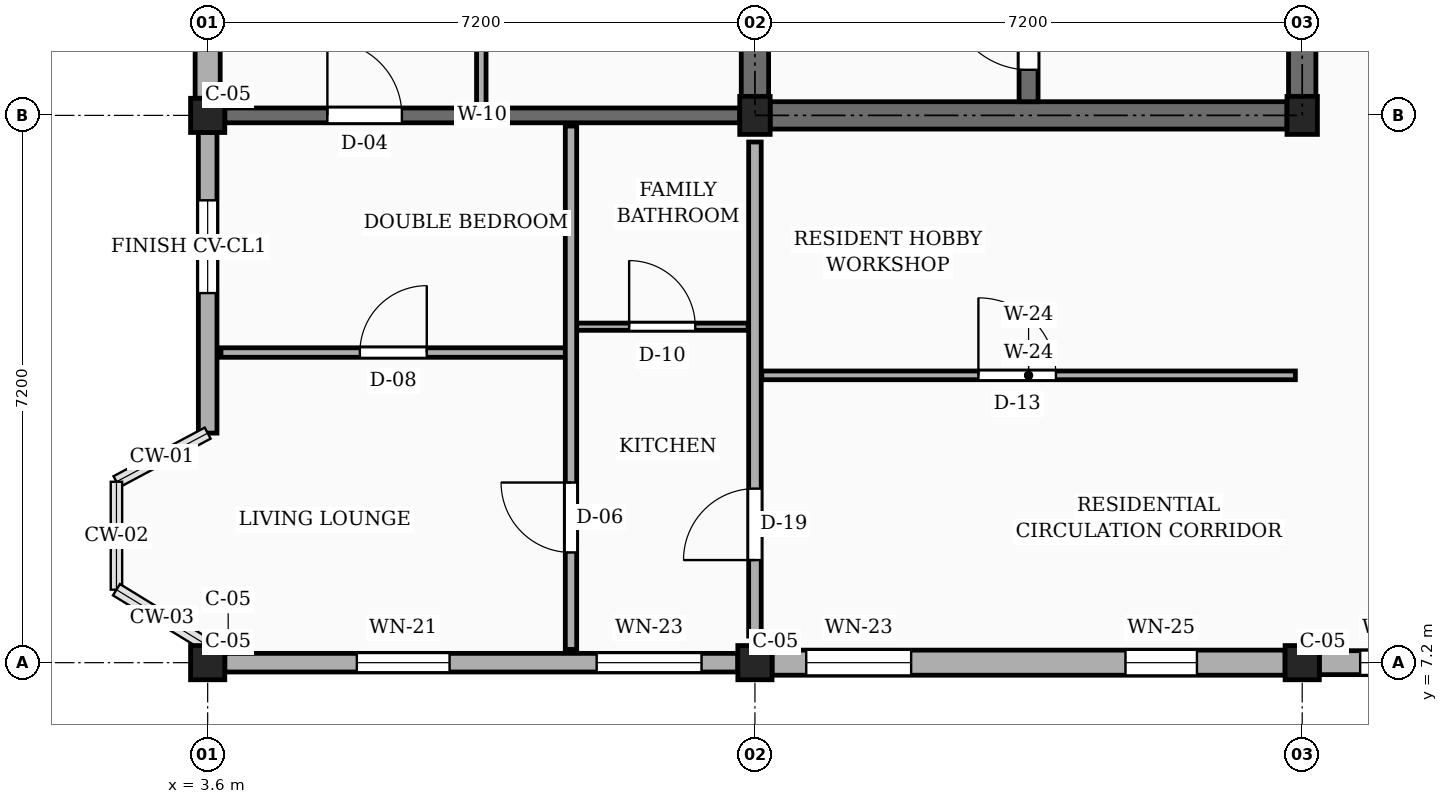
"""IFC4 building model, lengths in metres.
Left out: names, types, materials, properties, quantities, classifications, styles, units other than length and angle.
Written with IfcOpenShell. Run it as: python <this file> out.ifc"""

import sys

from ifc_helpers import new_model, si_unit, direction, frame, frame_2d, origin, origin_2d, place, context, subcontext, project, spatial, rectangle, extrude, element, fill, save


model = new_model("IFC4")
c1 = context("Model", 3, precision=1e-05, world=origin(), true_north=direction((0.0, 1.0)))
c2 = subcontext(c1, "Body", "Model", "MODEL_VIEW")
j1 = project(units=[si_unit("LENGTHUNIT", "METRE"), si_unit("PLANEANGLEUNIT", "RADIAN")], contexts=[c1])
p1 = place(None, origin())
s1 = spatial("IfcSite", under=j1, at=p1, CompositionType="ELEMENT")
p2 = place(p1, origin())
s2 = spatial("IfcBuilding", under=s1, at=p2, CompositionType="ELEMENT")
p3 = place(p2, frame((0.0, 0.0, 42.3)))
s3 = spatial("IfcBuildingStorey", under=s2, at=p3, CompositionType="ELEMENT", Elevation=42.3)
for number, where, z_axis, x_axis in (
    (1, (3.6, 7.2, 0.0), (0.0, 0.0, 1.0), (1.0, 0.0, 0.0)),
    (2, (3.6, 14.4, 0.0), (0.0, 0.0, 1.0), (1.0, 0.0, 0.0)),
    (3, (10.8, 7.2, 0.0), (0.0, 0.0, 1.0), (1.0, 0.0, 0.0)),
):
    element("IfcColumn", number, at=place(p3, frame(where, z_axis=z_axis, x_axis=x_axis)), inside=s3, PredefinedType="COLUMN", context=c2, shape_type="SweptSolid", body=[
        extrude(rectangle(XDim=0.45, YDim=0.45, at=origin_2d()), origin(), (0.0, 0.0, 1.0), 3.15),
    ])
p4 = place(p3, frame((10.8, 14.4, 0.0), z_axis=(0.0, 0.0, 1.0), x_axis=(1.0, 0.0, 0.0)))
e4 = element("IfcColumn", 4, at=p4, inside=s3, PredefinedType="COLUMN", context=c2, shape_type="SweptSolid", body=[
    extrude(rectangle(XDim=0.4, YDim=0.5, at=origin_2d()), origin(), (0.0, 0.0, 1.0), 3.15),
])
p5 = place(p3, frame((18.0, 7.2, 0.0), z_axis=(0.0, 0.0, 1.0), x_axis=(1.0, 0.0, 0.0)))
e5 = element("IfcColumn", 5, at=p5, inside=s3, PredefinedType="COLUMN", context=c2, shape_type="SweptSolid", body=[
    extrude(rectangle(XDim=0.45, YDim=0.45, at=origin_2d()), origin(), (0.0, 0.0, 1.0), 3.15),
])
p6 = place(p3, frame((18.0, 14.4, 0.0), z_axis=(0.0, 0.0, 1.0), x_axis=(1.0, 0.0, 0.0)))
e6 = element("IfcColumn", 6, at=p6, inside=s3, PredefinedType="COLUMN", context=c2, shape_type="SweptSolid", body=[
    extrude(rectangle(XDim=0.4, YDim=0.5, at=origin_2d()), origin(), (0.0, 0.0, 1.0), 3.15),
])
p7 = place(p3, frame((3.825, 14.4, 0.0), z_axis=(0.0, 0.0, 1.0), x_axis=(1.0, 0.0, 0.0)))
e7 = element("IfcWall", 7, at=p7, inside=s3, PredefinedType="SOLIDWALL", context=c2, shape_type="SweptSolid", body=[
    extrude(rectangle(XDim=6.775, YDim=0.195, at=frame_2d((3.388, 0.0))), origin(), (0.0, 0.0, 1.0), 2.17),
])
p8 = place(p7, frame((1.35, 0.0, 0.0)))
e8 = element("IfcOpeningElement", 8, at=p8, cuts=e7, PredefinedType="OPENING", context=c2, shape_type="SweptSolid", body=[
    extrude(rectangle(XDim=0.98, YDim=2.12, at=frame_2d((0.49, 1.06))), frame((0.0, 0.107, 0.0), z_axis=(0.0, -1.0, 0.0), x_axis=(1.0, 0.0, 0.0)), (0.0, 0.0, 1.0), 0.215),
])
p9 = place(p3, frame((3.825, 7.2, 0.0), z_axis=(0.0, 0.0, 1.0), x_axis=(1.0, 0.0, 0.0)))
e9 = element("IfcWall", 9, at=p9, inside=s3, PredefinedType="SOLIDWALL", context=c2, shape_type="SweptSolid", body=[
    extrude(rectangle(XDim=6.75, YDim=0.245, at=frame_2d((3.375, 0.0))), origin(), (0.0, 0.0, 1.0), 2.44),
])
p10 = place(p9, frame((1.738, 0.0, 0.78)))
e10 = element("IfcOpeningElement", 10, at=p10, cuts=e9, PredefinedType="OPENING", context=c2, shape_type="SweptSolid", body=[
    extrude(rectangle(XDim=1.22, YDim=1.36, at=frame_2d((0.61, 0.68))), frame((0.0, 0.133, 0.0), z_axis=(0.0, -1.0, 0.0), x_axis=(1.0, 0.0, 0.0)), (0.0, 0.0, 1.0), 0.265),
])
p11 = place(p9, frame((4.893, 0.0, 0.78)))
e11 = element("IfcOpeningElement", 11, at=p11, cuts=e9, PredefinedType="OPENING", context=c2, shape_type="SweptSolid", body=[
    extrude(rectangle(XDim=1.38, YDim=1.36, at=frame_2d((0.69, 0.68))), frame((0.0, 0.133, 0.0), z_axis=(0.0, -1.0, 0.0), x_axis=(1.0, 0.0, 0.0)), (0.0, 0.0, 1.0), 0.265),
])
p12 = place(p3, frame((11.025, 7.2, 0.0), z_axis=(0.0, 0.0, 1.0), x_axis=(1.0, 0.0, 0.0)))
e12 = element("IfcWall", 12, at=p12, inside=s3, PredefinedType="SOLIDWALL", context=c2, shape_type="SweptSolid", body=[
    extrude(rectangle(XDim=6.75, YDim=0.33, at=frame_2d((3.375, 0.0))), origin(), (0.0, 0.0, 1.0), 2.44),
])
p13 = place(p12, frame((0.45, 0.0, 0.78)))
e13 = element("IfcOpeningElement", 13, at=p13, cuts=e12, PredefinedType="OPENING", context=c2, shape_type="SweptSolid", body=[
    extrude(rectangle(XDim=1.38, YDim=1.36, at=frame_2d((0.69, 0.68))), frame((0.0, 0.175, 0.0), z_axis=(0.0, -1.0, 0.0), x_axis=(1.0, 0.0, 0.0)), (0.0, 0.0, 1.0), 0.35),
])
p14 = place(p12, frame((4.65, 0.0, 0.78)))
e14 = element("IfcOpeningElement", 14, at=p14, cuts=e12, PredefinedType="OPENING", context=c2, shape_type="SweptSolid", body=[
    extrude(rectangle(XDim=0.94, YDim=1.44, at=frame_2d((0.47, 0.72))), frame((0.0, 0.175, 0.0), z_axis=(0.0, -1.0, 0.0), x_axis=(1.0, 0.0, 0.0)), (0.0, 0.0, 1.0), 0.35),
])
p15 = place(p3, frame((18.225, 7.2, 0.0), z_axis=(0.0, 0.0, 1.0), x_axis=(1.0, 0.0, 0.0)))
e15 = element("IfcWall", 15, at=p15, inside=s3, PredefinedType="SOLIDWALL", context=c2, shape_type="SweptSolid", body=[
    extrude(rectangle(XDim=6.75, YDim=0.315, at=frame_2d((3.375, 0.0))), origin(), (0.0, 0.0, 1.0), 2.44),
])
p16 = place(p15, frame((0.538, 0.0, 0.78)))
e16 = element("IfcOpeningElement", 16, at=p16, cuts=e15, PredefinedType="OPENING", context=c2, shape_type="SweptSolid", body=[
    extrude(rectangle(XDim=0.94, YDim=1.44, at=frame_2d((0.47, 0.72))), frame((0.0, 0.167, 0.0), z_axis=(0.0, -1.0, 0.0), x_axis=(1.0, 0.0, 0.0)), (0.0, 0.0, 1.0), 0.335),
])
p17 = place(p15, frame((2.27, 0.0, 0.78)))
e17 = element("IfcOpeningElement", 17, at=p17, cuts=e15, PredefinedType="OPENING", context=c2, shape_type="SweptSolid", body=[
    extrude(rectangle(XDim=1.15, YDim=1.44, at=frame_2d((0.575, 0.72))), frame((0.0, 0.167, 0.0), z_axis=(0.0, -1.0, 0.0), x_axis=(1.0, 0.0, 0.0)), (0.0, 0.0, 1.0), 0.335),
])
p18 = place(p15, frame((4.538, 0.0, 0.78)))
e18 = element("IfcOpeningElement", 18, at=p18, cuts=e15, PredefinedType="OPENING", context=c2, shape_type="SweptSolid", body=[
    extrude(rectangle(XDim=1.35, YDim=1.44, at=frame_2d((0.675, 0.72))), frame((0.0, 0.167, 0.0), z_axis=(0.0, -1.0, 0.0), x_axis=(1.0, 0.0, 0.0)), (0.0, 0.0, 1.0), 0.335),
])
p19 = place(p3, frame((3.6, 21.375, 0.0), z_axis=(0.0, 0.0, 1.0), x_axis=(0.0, -1.0, 0.0)))
e19 = element("IfcWall", 19, at=p19, inside=s3, PredefinedType="SOLIDWALL", context=c2, shape_type="SweptSolid", body=[
    extrude(rectangle(XDim=6.75, YDim=0.33, at=frame_2d((3.375, 0.0))), origin(), (0.0, 0.0, 1.0), 2.44),
])
p20 = place(p19, frame((0.45, 0.0, 0.78)))
e20 = element("IfcOpeningElement", 20, at=p20, cuts=e19, PredefinedType="OPENING", context=c2, shape_type="SweptSolid", body=[
    extrude(rectangle(XDim=1.06, YDim=1.36, at=frame_2d((0.53, 0.68))), frame((0.0, 0.175, 0.0), z_axis=(0.0, -1.0, 0.0), x_axis=(1.0, 0.0, 0.0)), (0.0, 0.0, 1.0), 0.35),
])
p21 = place(p19, frame((4.65, 0.0, 0.78)))
e21 = element("IfcOpeningElement", 21, at=p21, cuts=e19, PredefinedType="OPENING", context=c2, shape_type="SweptSolid", body=[
    extrude(rectangle(XDim=1.22, YDim=1.36, at=frame_2d((0.61, 0.68))), frame((0.0, 0.175, 0.0), z_axis=(0.0, -1.0, 0.0), x_axis=(1.0, 0.0, 0.0)), (0.0, 0.0, 1.0), 0.35),
])
p22 = place(p3, frame((3.6, 14.175, 0.0), z_axis=(0.0, 0.0, 1.0), x_axis=(0.0, -1.0, 0.0)))
e22 = element("IfcWall", 22, at=p22, inside=s3, PredefinedType="SOLIDWALL", context=c2, shape_type="SweptSolid", body=[
    extrude(rectangle(XDim=3.955, YDim=0.245, at=frame_2d((1.978, 0.0))), origin(), (0.0, 0.0, 1.0), 2.44),
])
p23 = place(p22, frame((0.893, 0.0, 0.78)))
e23 = element("IfcOpeningElement", 23, at=p23, cuts=e22, PredefinedType="OPENING", context=c2, shape_type="SweptSolid", body=[
    extrude(rectangle(XDim=1.22, YDim=1.36, at=frame_2d((0.61, 0.68))), frame((0.0, 0.133, 0.0), z_axis=(0.0, -1.0, 0.0), x_axis=(1.0, 0.0, 0.0)), (0.0, 0.0, 1.0), 0.265),
])
p24 = place(p3, frame((10.8, 14.65, 0.0), z_axis=(0.0, 0.0, 1.0), x_axis=(0.0, 1.0, 0.0)))
e24 = element("IfcWall", 24, at=p24, inside=s3, PredefinedType="SHEAR", context=c2, shape_type="SweptSolid", body=[
    extrude(rectangle(XDim=6.7, YDim=0.36, at=frame_2d((3.35, 0.0))), origin(), (0.0, 0.0, 1.0), 2.87),
])
p25 = place(p3, frame((18.0, 14.65, 0.0), z_axis=(0.0, 0.0, 1.0), x_axis=(0.0, 1.0, 0.0)))
e25 = element("IfcWall", 25, at=p25, inside=s3, PredefinedType="SHEAR", context=c2, shape_type="SweptSolid", body=[
    extrude(rectangle(XDim=6.7, YDim=0.36, at=frame_2d((3.35, 0.0))), origin(), (0.0, 0.0, 1.0), 2.87),
])
p26 = place(p25, frame((1.5, 0.0, 0.0)))
e26 = element("IfcOpeningElement", 26, at=p26, cuts=e25, PredefinedType="OPENING", context=c2, shape_type="SweptSolid", body=[
    extrude(rectangle(XDim=1.1, YDim=2.15, at=frame_2d((0.55, 1.075))), frame((0.0, 0.19, 0.0), z_axis=(0.0, -1.0, 0.0), x_axis=(1.0, 0.0, 0.0)), (0.0, 0.0, 1.0), 0.38),
])
p27 = place(p3, frame((11.0, 14.4, 0.0), z_axis=(0.0, 0.0, 1.0), x_axis=(1.0, 0.0, 0.0)))
e27 = element("IfcWall", 27, at=p27, inside=s3, PredefinedType="SHEAR", context=c2, shape_type="SweptSolid", body=[
    extrude(rectangle(XDim=6.8, YDim=0.36, at=frame_2d((3.4, 0.0))), origin(), (0.0, 0.0, 1.0), 2.87),
])
p28 = place(p3, frame((14.4, 14.58, 0.0), z_axis=(0.0, 0.0, 1.0), x_axis=(0.0, 1.0, 0.0)))
e28 = element("IfcWall", 28, at=p28, inside=s3, PredefinedType="SHEAR", context=c2, shape_type="SweptSolid", body=[
    extrude(rectangle(XDim=6.84, YDim=0.25, at=frame_2d((3.42, 0.0))), origin(), (0.0, 0.0, 1.0), 2.87),
])
p29 = place(p28, frame((0.42, 0.0, 0.0)))
e29 = element("IfcOpeningElement", 29, at=p29, cuts=e28, PredefinedType="OPENING", context=c2, shape_type="SweptSolid", body=[
    extrude(rectangle(XDim=1.05, YDim=2.15, at=frame_2d((0.525, 1.075))), frame((0.0, 0.135, 0.0), z_axis=(0.0, -1.0, 0.0), x_axis=(1.0, 0.0, 0.0)), (0.0, 0.0, 1.0), 0.27),
])
p30 = place(p3, frame((10.8, 7.55, 0.0), z_axis=(0.0, 0.0, 1.0), x_axis=(0.0, 1.0, 0.0)))
e30 = element("IfcWall", 30, at=p30, inside=s3, PredefinedType="PARTITIONING", context=c2, shape_type="SweptSolid", body=[
    extrude(rectangle(XDim=6.5, YDim=0.165, at=frame_2d((3.25, 0.0))), origin(), (0.0, 0.0, 1.0), 2.305),
])
p31 = place(p30, frame((1.0, 0.0, 0.0)))
e31 = element("IfcOpeningElement", 31, at=p31, cuts=e30, PredefinedType="OPENING", context=c2, shape_type="SweptSolid", body=[
    extrude(rectangle(XDim=0.94, YDim=2.12, at=frame_2d((0.47, 1.06))), frame((0.0, 0.093, 0.0), z_axis=(0.0, -1.0, 0.0), x_axis=(1.0, 0.0, 0.0)), (0.0, 0.0, 1.0), 0.185),
])
p32 = place(p3, frame((10.89, 10.98, 0.0), z_axis=(0.0, 0.0, 1.0), x_axis=(1.0, 0.0, 0.0)))
e32 = element("IfcWall", 32, at=p32, inside=s3, PredefinedType="PARTITIONING", context=c2, shape_type="SweptSolid", body=[
    extrude(rectangle(XDim=7.02, YDim=0.115, at=frame_2d((3.51, 0.0))), origin(), (0.0, 0.0, 1.0), 2.305),
])
p33 = place(p32, frame((2.85, 0.0, 0.0)))
e33 = element("IfcOpeningElement", 33, at=p33, cuts=e32, PredefinedType="OPENING", context=c2, shape_type="SweptSolid", body=[
    extrude(rectangle(XDim=1.02, YDim=2.15, at=frame_2d((0.51, 1.075))), frame((0.0, 0.067, 0.0), z_axis=(0.0, -1.0, 0.0), x_axis=(1.0, 0.0, 0.0)), (0.0, 0.0, 1.0), 0.135),
])
p34 = place(p3, frame((3.775, 11.28, 0.0), z_axis=(0.0, 0.0, 1.0), x_axis=(1.0, 0.0, 0.0)))
e34 = element("IfcWall", 34, at=p34, inside=s3, PredefinedType="PARTITIONING", context=c2, shape_type="SweptSolid", body=[
    extrude(rectangle(XDim=4.535, YDim=0.125, at=frame_2d((2.268, 0.0))), origin(), (0.0, 0.0, 1.0), 2.305),
])
p35 = place(p34, frame((1.827, 0.0, 0.0)))
e35 = element("IfcOpeningElement", 35, at=p35, cuts=e34, PredefinedType="OPENING", context=c2, shape_type="SweptSolid", body=[
    extrude(rectangle(XDim=0.88, YDim=2.08, at=frame_2d((0.44, 1.04))), frame((0.0, 0.073, 0.0), z_axis=(0.0, -1.0, 0.0), x_axis=(1.0, 0.0, 0.0)), (0.0, 0.0, 1.0), 0.145),
])
p36 = place(p3, frame((8.45, 11.62, 0.0), z_axis=(0.0, 0.0, 1.0), x_axis=(1.0, 0.0, 0.0)))
e36 = element("IfcWall", 36, at=p36, inside=s3, PredefinedType="PARTITIONING", context=c2, shape_type="SweptSolid", body=[
    extrude(rectangle(XDim=2.26, YDim=0.095, at=frame_2d((1.13, 0.0))), origin(), (0.0, 0.0, 1.0), 2.305),
])
p37 = place(p36, frame((0.695, 0.0, 0.0)))
e37 = element("IfcOpeningElement", 37, at=p37, cuts=e36, PredefinedType="OPENING", context=c2, shape_type="SweptSolid", body=[
    extrude(rectangle(XDim=0.87, YDim=2.05, at=frame_2d((0.435, 1.025))), frame((0.0, 0.058, 0.0), z_axis=(0.0, -1.0, 0.0), x_axis=(1.0, 0.0, 0.0)), (0.0, 0.0, 1.0), 0.115),
])
p38 = place(p3, frame((8.38, 7.375, 0.0), z_axis=(0.0, 0.0, 1.0), x_axis=(0.0, 1.0, 0.0)))
e38 = element("IfcWall", 38, at=p38, inside=s3, PredefinedType="PARTITIONING", context=c2, shape_type="SweptSolid", body=[
    extrude(rectangle(XDim=6.885, YDim=0.15, at=frame_2d((3.442, 0.0))), origin(), (0.0, 0.0, 1.0), 2.305),
])
p39 = place(p38, frame((1.275, 0.0, 0.0)))
e39 = element("IfcOpeningElement", 39, at=p39, cuts=e38, PredefinedType="OPENING", context=c2, shape_type="SweptSolid", body=[
    extrude(rectangle(XDim=0.92, YDim=2.1, at=frame_2d((0.46, 1.05))), frame((0.0, 0.085, 0.0), z_axis=(0.0, -1.0, 0.0), x_axis=(1.0, 0.0, 0.0)), (0.0, 0.0, 1.0), 0.17),
])
p40 = place(p3, frame((7.2, 14.54, 0.0), z_axis=(0.0, 0.0, 1.0), x_axis=(0.0, 1.0, 0.0)))
e40 = element("IfcWall", 40, at=p40, inside=s3, PredefinedType="PARTITIONING", context=c2, shape_type="SweptSolid", body=[
    extrude(rectangle(XDim=6.92, YDim=0.125, at=frame_2d((3.46, 0.0))), origin(), (0.0, 0.0, 1.0), 2.305),
])
p41 = place(p40, frame((1.05, 0.0, 0.0)))
e41 = element("IfcOpeningElement", 41, at=p41, cuts=e40, PredefinedType="OPENING", context=c2, shape_type="SweptSolid", body=[
    extrude(rectangle(XDim=0.87, YDim=2.05, at=frame_2d((0.435, 1.025))), frame((0.0, 0.073, 0.0), z_axis=(0.0, -1.0, 0.0), x_axis=(1.0, 0.0, 0.0)), (0.0, 0.0, 1.0), 0.145),
])
p42 = place(p40, frame((4.45, 0.0, 0.0)))
e42 = element("IfcOpeningElement", 42, at=p42, cuts=e40, PredefinedType="OPENING", context=c2, shape_type="SweptSolid", body=[
    extrude(rectangle(XDim=0.88, YDim=2.08, at=frame_2d((0.44, 1.04))), frame((0.0, 0.073, 0.0), z_axis=(0.0, -1.0, 0.0), x_axis=(1.0, 0.0, 0.0)), (0.0, 0.0, 1.0), 0.145),
])
p43 = place(p10, origin())
e43 = element("IfcWindow", 43, at=p43, inside=s3, PartitioningType="SINGLE_PANEL", PredefinedType="WINDOW", context=c2, shape_type="SweptSolid", body=[
    extrude(rectangle(XDim=1.22, YDim=1.36, at=frame_2d((0.61, 0.68))), frame((0.0, 0.03, 0.0), z_axis=(0.0, -1.0, 0.0), x_axis=(1.0, 0.0, 0.0)), (0.0, 0.0, 1.0), 0.06),
])
fill(e10, e43)
p44 = place(p11, origin())
e44 = element("IfcWindow", 44, at=p44, inside=s3, PartitioningType="SINGLE_PANEL", PredefinedType="WINDOW", context=c2, shape_type="SweptSolid", body=[
    extrude(rectangle(XDim=1.38, YDim=1.36, at=frame_2d((0.69, 0.68))), frame((0.0, 0.03, 0.0), z_axis=(0.0, -1.0, 0.0), x_axis=(1.0, 0.0, 0.0)), (0.0, 0.0, 1.0), 0.06),
])
fill(e11, e44)
p45 = place(p13, origin())
e45 = element("IfcWindow", 45, at=p45, inside=s3, PartitioningType="SINGLE_PANEL", PredefinedType="WINDOW", context=c2, shape_type="SweptSolid", body=[
    extrude(rectangle(XDim=1.38, YDim=1.36, at=frame_2d((0.69, 0.68))), frame((0.0, 0.03, 0.0), z_axis=(0.0, -1.0, 0.0), x_axis=(1.0, 0.0, 0.0)), (0.0, 0.0, 1.0), 0.06),
])
fill(e13, e45)
p46 = place(p14, origin())
e46 = element("IfcWindow", 46, at=p46, inside=s3, PartitioningType="SINGLE_PANEL", PredefinedType="WINDOW", context=c2, shape_type="SweptSolid", body=[
    extrude(rectangle(XDim=0.94, YDim=1.44, at=frame_2d((0.47, 0.72))), frame((0.0, 0.03, 0.0), z_axis=(0.0, -1.0, 0.0), x_axis=(1.0, 0.0, 0.0)), (0.0, 0.0, 1.0), 0.06),
])
fill(e14, e46)
p47 = place(p16, origin())
e47 = element("IfcWindow", 47, at=p47, inside=s3, PartitioningType="SINGLE_PANEL", PredefinedType="WINDOW", context=c2, shape_type="SweptSolid", body=[
    extrude(rectangle(XDim=0.94, YDim=1.44, at=frame_2d((0.47, 0.72))), frame((0.0, 0.03, 0.0), z_axis=(0.0, -1.0, 0.0), x_axis=(1.0, 0.0, 0.0)), (0.0, 0.0, 1.0), 0.06),
])
fill(e16, e47)
p48 = place(p23, origin())
e48 = element("IfcWindow", 48, at=p48, inside=s3, PartitioningType="SINGLE_PANEL", PredefinedType="WINDOW", context=c2, shape_type="SweptSolid", body=[
    extrude(rectangle(XDim=1.22, YDim=1.36, at=frame_2d((0.61, 0.68))), frame((0.0, 0.03, 0.0), z_axis=(0.0, -1.0, 0.0), x_axis=(1.0, 0.0, 0.0)), (0.0, 0.0, 1.0), 0.06),
])
fill(e23, e48)
p49 = place(p29, origin())
e49 = element("IfcDoor", 49, at=p49, inside=s3, OperationType="SINGLE_SWING_RIGHT", PredefinedType="DOOR", context=c2, shape_type="SweptSolid", body=[
    extrude(rectangle(XDim=1.05, YDim=2.15, at=frame_2d((0.525, 1.075))), frame((0.0, 0.025, 0.0), z_axis=(0.0, -1.0, 0.0), x_axis=(1.0, 0.0, 0.0)), (0.0, 0.0, 1.0), 0.05),
])
fill(e29, e49)
p50 = place(p31, origin())
e50 = element("IfcDoor", 50, at=p50, inside=s3, OperationType="SINGLE_SWING_LEFT", PredefinedType="DOOR", context=c2, shape_type="SweptSolid", body=[
    extrude(rectangle(XDim=0.94, YDim=2.12, at=frame_2d((0.47, 1.06))), frame((0.0, 0.025, 0.0), z_axis=(0.0, -1.0, 0.0), x_axis=(1.0, 0.0, 0.0)), (0.0, 0.0, 1.0), 0.05),
])
fill(e31, e50)
p51 = place(p33, origin())
e51 = element("IfcDoor", 51, at=p51, inside=s3, OperationType="SINGLE_SWING_LEFT", PredefinedType="DOOR", context=c2, shape_type="SweptSolid", body=[
    extrude(rectangle(XDim=1.02, YDim=2.15, at=frame_2d((0.51, 1.075))), frame((0.0, 0.025, 0.0), z_axis=(0.0, -1.0, 0.0), x_axis=(1.0, 0.0, 0.0)), (0.0, 0.0, 1.0), 0.05),
])
fill(e33, e51)
p52 = place(p35, origin())
e52 = element("IfcDoor", 52, at=p52, inside=s3, OperationType="SINGLE_SWING_RIGHT", PredefinedType="DOOR", context=c2, shape_type="SweptSolid", body=[
    extrude(rectangle(XDim=0.88, YDim=2.08, at=frame_2d((0.44, 1.04))), frame((0.0, 0.025, 0.0), z_axis=(0.0, -1.0, 0.0), x_axis=(1.0, 0.0, 0.0)), (0.0, 0.0, 1.0), 0.05),
])
fill(e35, e52)
p53 = place(p37, origin())
e53 = element("IfcDoor", 53, at=p53, inside=s3, OperationType="SINGLE_SWING_LEFT", PredefinedType="DOOR", context=c2, shape_type="SweptSolid", body=[
    extrude(rectangle(XDim=0.87, YDim=2.05, at=frame_2d((0.435, 1.025))), frame((0.0, 0.025, 0.0), z_axis=(0.0, -1.0, 0.0), x_axis=(1.0, 0.0, 0.0)), (0.0, 0.0, 1.0), 0.05),
])
fill(e37, e53)
p54 = place(p39, origin())
e54 = element("IfcDoor", 54, at=p54, inside=s3, OperationType="SINGLE_SWING_RIGHT", PredefinedType="DOOR", context=c2, shape_type="SweptSolid", body=[
    extrude(rectangle(XDim=0.92, YDim=2.1, at=frame_2d((0.46, 1.05))), frame((0.0, 0.025, 0.0), z_axis=(0.0, -1.0, 0.0), x_axis=(1.0, 0.0, 0.0)), (0.0, 0.0, 1.0), 0.05),
])
fill(e39, e54)
p55 = place(p8, origin())
e55 = element("IfcDoor", 55, at=p55, inside=s3, OperationType="SINGLE_SWING_LEFT", PredefinedType="DOOR", context=c2, shape_type="SweptSolid", body=[
    extrude(rectangle(XDim=0.98, YDim=2.12, at=frame_2d((0.49, 1.06))), frame((0.0, 0.025, 0.0), z_axis=(0.0, -1.0, 0.0), x_axis=(1.0, 0.0, 0.0)), (0.0, 0.0, 1.0), 0.05),
])
fill(e8, e55)
save(model, sys.argv[1])
